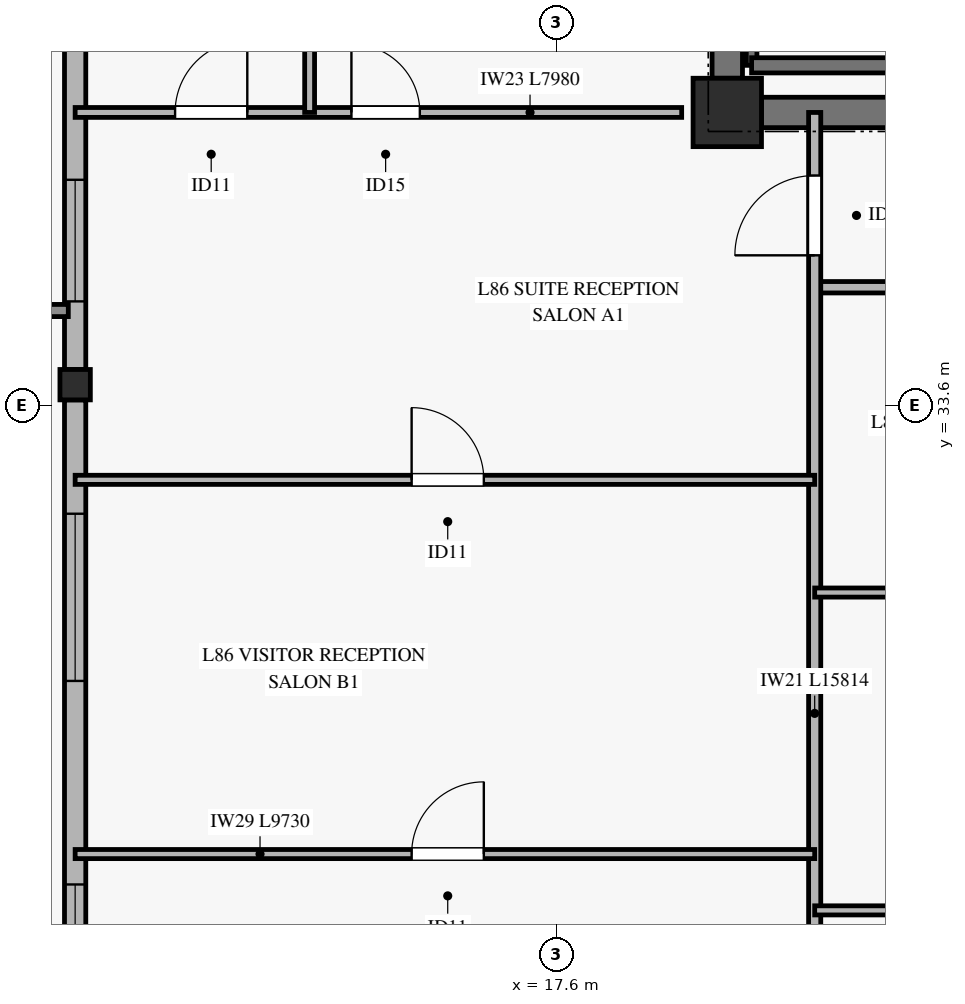
"""IFC4 building model, lengths in metres.
Left out: names, types, materials, properties, quantities, classifications, styles, units other than length and angle.
Written with IfcOpenShell. Run it as: python <this file> out.ifc"""

import sys

from ifc_helpers import new_model, si_unit, direction, frame, frame_2d, origin, origin_2d, place, context, subcontext, project, spatial, rectangle, hollow_rectangle, extrude, source, transform, mapped, element, fill, save


model = new_model("IFC4")
c1 = context("Model", 3, precision=1e-05, world=origin(), true_north=direction((0.0, 1.0)))
c2 = subcontext(c1, "Body", "Model", "MODEL_VIEW")
j1 = project(units=[si_unit("LENGTHUNIT", "METRE"), si_unit("PLANEANGLEUNIT", "RADIAN")], contexts=[c1])
p1 = place(None, origin())
s1 = spatial("IfcSite", under=j1, at=p1, CompositionType="ELEMENT")
p2 = place(p1, origin())
s2 = spatial("IfcBuilding", under=s1, at=p2, CompositionType="ELEMENT")
p3 = place(p2, frame((0.0, 0.0, 332.3)))
s3 = spatial("IfcBuildingStorey", under=s2, at=p3, CompositionType="ELEMENT", Elevation=332.3)
m1 = source(origin(), c2, "Body", "SweptSolid", [
    extrude(rectangle(XDim=0.9, YDim=0.9, at=origin_2d()), origin(), (0.0, 0.0, 1.0), 3.185),
])
p4 = place(p3, frame((19.85, 37.45, 0.0), z_axis=(0.0, 0.0, 1.0), x_axis=(1.0, 0.0, 0.0)))
e1 = element("IfcColumn", 1, at=p4, inside=s3, PredefinedType="PILASTER", context=c2, shape_type="MappedRepresentation", body=[
    mapped(m1, transform((0.0, 0.0, 0.0), x_axis=(1.0, 0.0, 0.0), y_axis=(0.0, 1.0, 0.0), z_axis=(0.0, 0.0, 1.0), scale=1.0)),
])
p5 = place(p3, frame((20.3, 37.45, 0.0), z_axis=(0.0, 0.0, 1.0), x_axis=(1.0, 0.0, 0.0)))
e2 = element("IfcWall", 2, at=p5, inside=s3, PredefinedType="SHEAR", context=c2, shape_type="SweptSolid", body=[
    extrude(rectangle(XDim=10.05, YDim=0.4, at=frame_2d((5.025, 0.0))), origin(), (0.0, 0.0, 1.0), 3.185),
])
p6 = place(p5, frame((4.25, 0.0, 0.0)))
e3 = element("IfcOpeningElement", 3, at=p6, cuts=e2, PredefinedType="OPENING", context=c2, shape_type="SweptSolid", body=[
    extrude(rectangle(XDim=1.2, YDim=2.15, at=frame_2d((0.6, 1.075))), frame((0.0, 0.21, 0.0), z_axis=(0.0, -1.0, 0.0), x_axis=(1.0, 0.0, 0.0)), (0.0, 0.0, 1.0), 0.42),
])
p7 = place(p3, frame((19.85, 37.9, 0.0), z_axis=(0.0, 0.0, 1.0), x_axis=(0.0, 1.0, 0.0)))
e4 = element("IfcWall", 4, at=p7, inside=s3, PredefinedType="SHEAR", context=c2, shape_type="SweptSolid", body=[
    extrude(rectangle(XDim=8.2, YDim=0.4, at=frame_2d((4.1, 0.0))), origin(), (0.0, 0.0, 1.0), 3.185),
])
m2 = source(origin(), c2, "Body", "SweptSolid", [
    extrude(hollow_rectangle(XDim=0.4, YDim=0.4, WallThickness=0.02, at=origin_2d()), origin(), (0.0, 0.0, 1.0), 3.246),
])
p8 = place(p3, frame((11.27, 33.868, 0.0), z_axis=(0.127876528395, 0.143597819239, 0.981339523201), x_axis=(-0.746804669772, 0.665043446104, 0.0)))
e5 = element("IfcColumn", 5, at=p8, inside=s3, PredefinedType="COLUMN", context=c2, shape_type="MappedRepresentation", body=[
    mapped(m2, transform((0.0, 0.0, 0.0), x_axis=(1.0, 0.0, 0.0), y_axis=(0.0, 1.0, 0.0), z_axis=(0.0, 0.0, 1.0), scale=1.0)),
])
p9 = place(p3, frame((11.27, 23.928, 0.0), z_axis=(0.0, 0.0, 1.0), x_axis=(0.0, 1.0, 0.0)))
e6 = element("IfcWall", 6, at=p9, inside=s3, PredefinedType="SOLIDWALL", context=c2, shape_type="SweptSolid", body=[
    extrude(rectangle(XDim=9.74, YDim=0.28, at=frame_2d((4.87, 0.0))), origin(), (0.0, 0.0, 1.0), 2.815),
])
p10 = place(p9, frame((1.164, 0.0, 0.45)))
e7 = element("IfcOpeningElement", 7, at=p10, cuts=e6, PredefinedType="OPENING", context=c2, shape_type="SweptSolid", body=[
    extrude(rectangle(XDim=2.2, YDim=2.1, at=frame_2d((1.1, 1.05))), frame((0.0, 0.15, 0.0), z_axis=(0.0, -1.0, 0.0), x_axis=(1.0, 0.0, 0.0)), (0.0, 0.0, 1.0), 0.3),
])
p11 = place(p9, frame((6.042, 0.0, 0.45)))
e8 = element("IfcOpeningElement", 8, at=p11, cuts=e6, PredefinedType="OPENING", context=c2, shape_type="SweptSolid", body=[
    extrude(rectangle(XDim=2.2, YDim=2.1, at=frame_2d((1.1, 1.05))), frame((0.0, 0.15, 0.0), z_axis=(0.0, -1.0, 0.0), x_axis=(1.0, 0.0, 0.0)), (0.0, 0.0, 1.0), 0.3),
])
p12 = place(p3, frame((11.27, 34.068, 0.0), z_axis=(0.0, 0.0, 1.0), x_axis=(0.0, 1.0, 0.0)))
e9 = element("IfcWall", 9, at=p12, inside=s3, PredefinedType="SOLIDWALL", context=c2, shape_type="SweptSolid", body=[
    extrude(rectangle(XDim=9.74, YDim=0.28, at=frame_2d((4.87, 0.0))), origin(), (0.0, 0.0, 1.0), 2.815),
])
p13 = place(p12, frame((0.896, 0.0, 0.45)))
e10 = element("IfcOpeningElement", 10, at=p13, cuts=e9, PredefinedType="OPENING", context=c2, shape_type="SweptSolid", body=[
    extrude(rectangle(XDim=1.6, YDim=2.0, at=frame_2d((0.8, 1.0))), frame((0.0, 0.15, 0.0), z_axis=(0.0, -1.0, 0.0), x_axis=(1.0, 0.0, 0.0)), (0.0, 0.0, 1.0), 0.3),
])
p14 = place(p3, frame((20.17, 38.07, 0.0), z_axis=(0.0, 0.0, 1.0), x_axis=(0.0, 1.0, 0.0)))
e11 = element("IfcWall", 11, at=p14, inside=s3, PredefinedType="SOLIDWALL", context=c2, shape_type="SweptSolid", body=[
    extrude(rectangle(XDim=7.25, YDim=0.14, at=frame_2d((3.625, 0.0))), origin(), (0.0, 0.0, 1.0), 3.4),
])
p15 = place(p3, frame((20.17, 38.07, 0.0), z_axis=(0.0, 0.0, 1.0), x_axis=(1.0, 0.0, 0.0)))
e12 = element("IfcWall", 12, at=p15, inside=s3, PredefinedType="SOLIDWALL", context=c2, shape_type="SweptSolid", body=[
    extrude(rectangle(XDim=3.05, YDim=0.2, at=frame_2d((1.525, 0.0))), origin(), (0.0, 0.0, 1.0), 3.4),
])
p16 = place(p3, frame((21.0, 35.15, 0.0), z_axis=(0.0, 0.0, 1.0), x_axis=(1.0, 0.0, 0.0)))
e13 = element("IfcWall", 13, at=p16, inside=s3, PredefinedType="PARTITIONING", context=c2, shape_type="SweptSolid", body=[
    extrude(rectangle(XDim=23.2, YDim=0.15, at=frame_2d((11.6, 0.0))), origin(), (0.0, 0.0, 1.0), 2.47),
])
p17 = place(p16, frame((4.577, 0.0, 0.0)))
e14 = element("IfcOpeningElement", 14, at=p17, cuts=e13, PredefinedType="OPENING", context=c2, shape_type="SweptSolid", body=[
    extrude(rectangle(XDim=1.05, YDim=2.15, at=frame_2d((0.525, 1.075))), frame((0.0, 0.085, 0.0), z_axis=(0.0, -1.0, 0.0), x_axis=(1.0, 0.0, 0.0)), (0.0, 0.0, 1.0), 0.17),
])
p18 = place(p16, frame((16.177, 0.0, 0.0)))
e15 = element("IfcOpeningElement", 15, at=p18, cuts=e13, PredefinedType="OPENING", context=c2, shape_type="SweptSolid", body=[
    extrude(rectangle(XDim=1.05, YDim=2.15, at=frame_2d((0.525, 1.075))), frame((0.0, 0.085, 0.0), z_axis=(0.0, -1.0, 0.0), x_axis=(1.0, 0.0, 0.0)), (0.0, 0.0, 1.0), 0.17),
])
p19 = place(p3, frame((21.0, 21.636, 0.0), z_axis=(0.0, 0.0, 1.0), x_axis=(0.0, 1.0, 0.0)))
e16 = element("IfcWall", 16, at=p19, inside=s3, PredefinedType="PARTITIONING", context=c2, shape_type="SweptSolid", body=[
    extrude(rectangle(XDim=15.814, YDim=0.16, at=frame_2d((7.907, 0.0))), origin(), (0.0, 0.0, 1.0), 2.77),
])
p20 = place(p19, frame((13.934, 0.0, 0.0)))
e17 = element("IfcOpeningElement", 17, at=p20, cuts=e16, PredefinedType="OPENING", context=c2, shape_type="SweptSolid", body=[
    extrude(rectangle(XDim=1.05, YDim=2.15, at=frame_2d((0.525, 1.075))), frame((0.0, 0.09, 0.0), z_axis=(0.0, -1.0, 0.0), x_axis=(1.0, 0.0, 0.0)), (0.0, 0.0, 1.0), 0.18),
])
p21 = place(p3, frame((11.27, 27.692, 0.0), z_axis=(0.0, 0.0, 1.0), x_axis=(1.0, 0.0, 0.0)))
e18 = element("IfcWall", 18, at=p21, inside=s3, PredefinedType="PARTITIONING", context=c2, shape_type="SweptSolid", body=[
    extrude(rectangle(XDim=9.73, YDim=0.12, at=frame_2d((4.865, 0.0))), origin(), (0.0, 0.0, 1.0), 2.47),
])
p22 = place(p21, frame((4.427, 0.0, 0.0)))
e19 = element("IfcOpeningElement", 19, at=p22, cuts=e18, PredefinedType="OPENING", context=c2, shape_type="SweptSolid", body=[
    extrude(rectangle(XDim=0.95, YDim=2.1, at=frame_2d((0.475, 1.05))), frame((0.0, 0.07, 0.0), z_axis=(0.0, -1.0, 0.0), x_axis=(1.0, 0.0, 0.0)), (0.0, 0.0, 1.0), 0.14),
])
p23 = place(p3, frame((11.27, 32.616, 0.0), z_axis=(0.0, 0.0, 1.0), x_axis=(1.0, 0.0, 0.0)))
e20 = element("IfcWall", 20, at=p23, inside=s3, PredefinedType="PARTITIONING", context=c2, shape_type="SweptSolid", body=[
    extrude(rectangle(XDim=9.73, YDim=0.12, at=frame_2d((4.865, 0.0))), origin(), (0.0, 0.0, 1.0), 2.47),
])
p24 = place(p23, frame((4.427, 0.0, 0.0)))
e21 = element("IfcOpeningElement", 21, at=p24, cuts=e20, PredefinedType="OPENING", context=c2, shape_type="SweptSolid", body=[
    extrude(rectangle(XDim=0.95, YDim=2.1, at=frame_2d((0.475, 1.05))), frame((0.0, 0.07, 0.0), z_axis=(0.0, -1.0, 0.0), x_axis=(1.0, 0.0, 0.0)), (0.0, 0.0, 1.0), 0.14),
])
p25 = place(p3, frame((21.0, 26.951, 0.0), z_axis=(0.0, 0.0, 1.0), x_axis=(1.0, 0.0, 0.0)))
e22 = element("IfcWall", 22, at=p25, inside=s3, PredefinedType="PARTITIONING", context=c2, shape_type="SweptSolid", body=[
    extrude(rectangle(XDim=11.6, YDim=0.12, at=frame_2d((5.8, 0.0))), origin(), (0.0, 0.0, 1.0), 2.47),
])
p26 = place(p25, frame((4.806, 0.0, 0.0)))
e23 = element("IfcOpeningElement", 23, at=p26, cuts=e22, PredefinedType="OPENING", context=c2, shape_type="SweptSolid", body=[
    extrude(rectangle(XDim=0.95, YDim=2.1, at=frame_2d((0.475, 1.05))), frame((0.0, 0.07, 0.0), z_axis=(0.0, -1.0, 0.0), x_axis=(1.0, 0.0, 0.0)), (0.0, 0.0, 1.0), 0.14),
])
p27 = place(p3, frame((21.0, 31.133, 0.0), z_axis=(0.0, 0.0, 1.0), x_axis=(1.0, 0.0, 0.0)))
e24 = element("IfcWall", 24, at=p27, inside=s3, PredefinedType="PARTITIONING", context=c2, shape_type="SweptSolid", body=[
    extrude(rectangle(XDim=11.6, YDim=0.12, at=frame_2d((5.8, 0.0))), origin(), (0.0, 0.0, 1.0), 2.47),
])
p28 = place(p27, frame((4.806, 0.0, 0.0)))
e25 = element("IfcOpeningElement", 25, at=p28, cuts=e24, PredefinedType="OPENING", context=c2, shape_type="SweptSolid", body=[
    extrude(rectangle(XDim=0.95, YDim=2.1, at=frame_2d((0.475, 1.05))), frame((0.0, 0.07, 0.0), z_axis=(0.0, -1.0, 0.0), x_axis=(1.0, 0.0, 0.0)), (0.0, 0.0, 1.0), 0.14),
])
p29 = place(p3, frame((11.27, 37.45, 0.0), z_axis=(0.0, 0.0, 1.0), x_axis=(1.0, 0.0, 0.0)))
e26 = element("IfcWall", 26, at=p29, inside=s3, PredefinedType="PARTITIONING", context=c2, shape_type="SweptSolid", body=[
    extrude(rectangle(XDim=7.98, YDim=0.13, at=frame_2d((3.99, 0.0))), origin(), (0.0, 0.0, 1.0), 2.82),
])
p30 = place(p29, frame((1.315, 0.0, 0.0)))
e27 = element("IfcOpeningElement", 27, at=p30, cuts=e26, PredefinedType="OPENING", context=c2, shape_type="SweptSolid", body=[
    extrude(rectangle(XDim=0.95, YDim=2.1, at=frame_2d((0.475, 1.05))), frame((0.0, 0.075, 0.0), z_axis=(0.0, -1.0, 0.0), x_axis=(1.0, 0.0, 0.0)), (0.0, 0.0, 1.0), 0.15),
])
p31 = place(p29, frame((3.635, 0.0, 0.0)))
e28 = element("IfcOpeningElement", 28, at=p31, cuts=e26, PredefinedType="OPENING", context=c2, shape_type="SweptSolid", body=[
    extrude(rectangle(XDim=0.9, YDim=2.1, at=frame_2d((0.45, 1.05))), frame((0.0, 0.075, 0.0), z_axis=(0.0, -1.0, 0.0), x_axis=(1.0, 0.0, 0.0)), (0.0, 0.0, 1.0), 0.15),
])
p32 = place(p3, frame((14.355, 37.45, 0.0), z_axis=(0.0, 0.0, 1.0), x_axis=(0.0, 1.0, 0.0)))
e29 = element("IfcWall", 29, at=p32, inside=s3, PredefinedType="PARTITIONING", context=c2, shape_type="SweptSolid", body=[
    extrude(rectangle(XDim=8.8, YDim=0.13, at=frame_2d((4.4, 0.0))), origin(), (0.0, 0.0, 1.0), 3.185),
])
m3 = source(origin(), c2, "Body", "SweptSolid", [
    extrude(rectangle(XDim=2.2, YDim=2.1, at=frame_2d((1.1, 1.05))), frame((0.0, 0.03, 0.0), z_axis=(0.0, -1.0, 0.0), x_axis=(1.0, 0.0, 0.0)), (0.0, 0.0, 1.0), 0.06),
])
p33 = place(p10, origin())
e30 = element("IfcWindow", 30, at=p33, inside=s3, PartitioningType="SINGLE_PANEL", PredefinedType="WINDOW", context=c2, shape_type="MappedRepresentation", body=[
    mapped(m3, transform((0.0, 0.0, 0.0), x_axis=(1.0, 0.0, 0.0), y_axis=(0.0, 1.0, 0.0), z_axis=(0.0, 0.0, 1.0), scale=1.0)),
])
fill(e7, e30)
p34 = place(p11, origin())
e31 = element("IfcWindow", 31, at=p34, inside=s3, PartitioningType="SINGLE_PANEL", PredefinedType="WINDOW", context=c2, shape_type="MappedRepresentation", body=[
    mapped(m3, transform((0.0, 0.0, 0.0), x_axis=(1.0, 0.0, 0.0), y_axis=(0.0, 1.0, 0.0), z_axis=(0.0, 0.0, 1.0), scale=1.0)),
])
fill(e8, e31)
m4 = source(origin(), c2, "Body", "SweptSolid", [
    extrude(rectangle(XDim=1.6, YDim=2.0, at=frame_2d((0.8, 1.0))), frame((0.0, 0.03, 0.0), z_axis=(0.0, -1.0, 0.0), x_axis=(1.0, 0.0, 0.0)), (0.0, 0.0, 1.0), 0.06),
])
p35 = place(p13, origin())
e32 = element("IfcWindow", 32, at=p35, inside=s3, PartitioningType="SINGLE_PANEL", PredefinedType="WINDOW", context=c2, shape_type="MappedRepresentation", body=[
    mapped(m4, transform((0.0, 0.0, 0.0), x_axis=(1.0, 0.0, 0.0), y_axis=(0.0, 1.0, 0.0), z_axis=(0.0, 0.0, 1.0), scale=1.0)),
])
fill(e10, e32)
m5 = source(origin(), c2, "Body", "SweptSolid", [
    extrude(rectangle(XDim=1.05, YDim=2.15, at=frame_2d((0.525, 1.075))), frame((0.0, 0.025, 0.0), z_axis=(0.0, -1.0, 0.0), x_axis=(1.0, 0.0, 0.0)), (0.0, 0.0, 1.0), 0.05),
])
p36 = place(p20, origin())
e33 = element("IfcDoor", 33, at=p36, inside=s3, OperationType="SINGLE_SWING_LEFT", PredefinedType="DOOR", context=c2, shape_type="MappedRepresentation", body=[
    mapped(m5, transform((0.0, 0.0, 0.0), x_axis=(1.0, 0.0, 0.0), y_axis=(0.0, 1.0, 0.0), z_axis=(0.0, 0.0, 1.0), scale=1.0)),
])
fill(e17, e33)
m6 = source(origin(), c2, "Body", "SweptSolid", [
    extrude(rectangle(XDim=0.95, YDim=2.1, at=frame_2d((0.475, 1.05))), frame((0.0, 0.025, 0.0), z_axis=(0.0, -1.0, 0.0), x_axis=(1.0, 0.0, 0.0)), (0.0, 0.0, 1.0), 0.05),
])
p37 = place(p24, origin())
e34 = element("IfcDoor", 34, at=p37, inside=s3, OperationType="SINGLE_SWING_LEFT", PredefinedType="DOOR", context=c2, shape_type="MappedRepresentation", body=[
    mapped(m6, transform((0.0, 0.0, 0.0), x_axis=(1.0, 0.0, 0.0), y_axis=(0.0, 1.0, 0.0), z_axis=(0.0, 0.0, 1.0), scale=1.0)),
])
fill(e21, e34)
p38 = place(p22, origin())
e35 = element("IfcDoor", 35, at=p38, inside=s3, OperationType="SINGLE_SWING_RIGHT", PredefinedType="DOOR", context=c2, shape_type="MappedRepresentation", body=[
    mapped(m6, transform((0.0, 0.0, 0.0), x_axis=(1.0, 0.0, 0.0), y_axis=(0.0, 1.0, 0.0), z_axis=(0.0, 0.0, 1.0), scale=1.0)),
])
fill(e19, e35)
p39 = place(p30, origin())
e36 = element("IfcDoor", 36, at=p39, inside=s3, OperationType="SINGLE_SWING_RIGHT", PredefinedType="DOOR", context=c2, shape_type="MappedRepresentation", body=[
    mapped(m6, transform((0.0, 0.0, 0.0), x_axis=(1.0, 0.0, 0.0), y_axis=(0.0, 1.0, 0.0), z_axis=(0.0, 0.0, 1.0), scale=1.0)),
])
fill(e27, e36)
m7 = source(origin(), c2, "Body", "SweptSolid", [
    extrude(rectangle(XDim=0.9, YDim=2.1, at=frame_2d((0.45, 1.05))), frame((0.0, 0.025, 0.0), z_axis=(0.0, -1.0, 0.0), x_axis=(1.0, 0.0, 0.0)), (0.0, 0.0, 1.0), 0.05),
])
p40 = place(p31, origin())
e37 = element("IfcDoor", 37, at=p40, inside=s3, OperationType="SINGLE_SWING_LEFT", PredefinedType="DOOR", context=c2, shape_type="MappedRepresentation", body=[
    mapped(m7, transform((0.0, 0.0, 0.0), x_axis=(1.0, 0.0, 0.0), y_axis=(0.0, 1.0, 0.0), z_axis=(0.0, 0.0, 1.0), scale=1.0)),
])
fill(e28, e37)
save(model, sys.argv[1])
